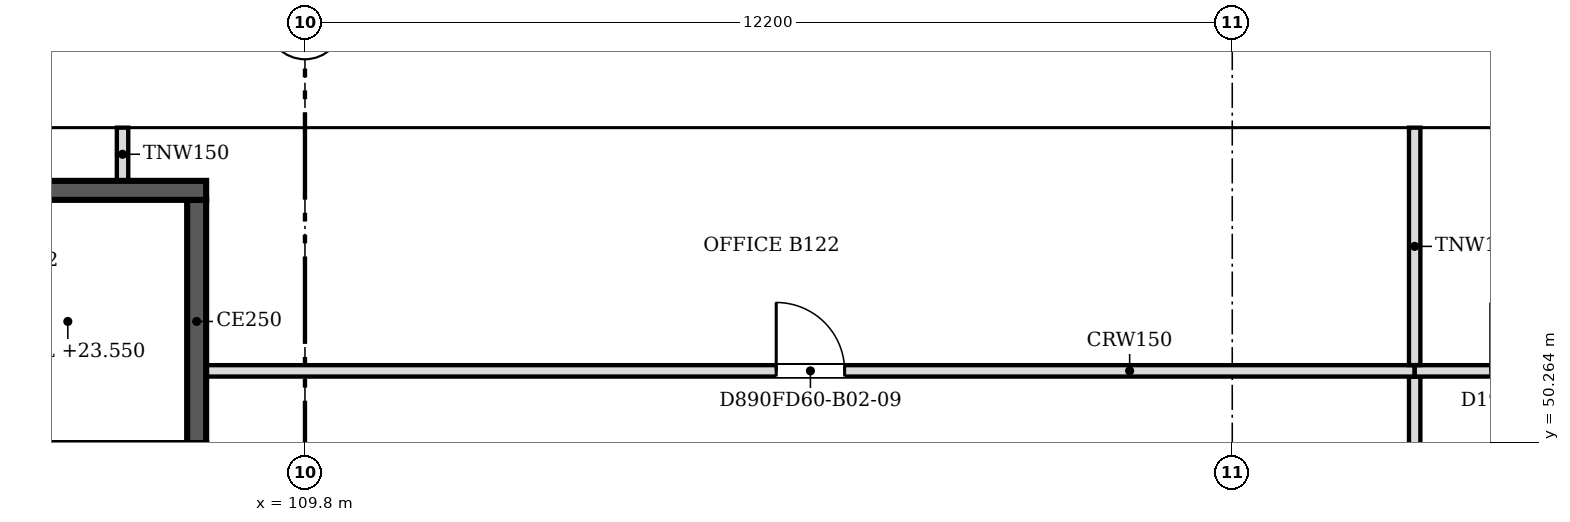
"""IFC4 building model, lengths in metres.
Left out: names, types, materials, properties, quantities, classifications, styles, units other than length and angle.
Written with IfcOpenShell. Run it as: python <this file> out.ifc"""

import sys

from ifc_helpers import new_model, si_unit, direction, frame, frame_2d, origin, place, context, subcontext, project, spatial, polyline, rectangle, outline, extrude, faceted_brep, source, transform, mapped, element, fill, save


model = new_model("IFC4")
c1 = context("Model", 3, precision=1e-05, world=origin(), true_north=direction((0.0, 1.0)))
c2 = subcontext(c1, "Body", "Model", "MODEL_VIEW")
j1 = project(units=[si_unit("LENGTHUNIT", "METRE"), si_unit("PLANEANGLEUNIT", "RADIAN")], contexts=[c1])
p1 = place(None, origin())
s1 = spatial("IfcSite", under=j1, at=p1, CompositionType="ELEMENT")
p2 = place(p1, origin())
s2 = spatial("IfcBuilding", under=s1, at=p2, CompositionType="ELEMENT")
p3 = place(p2, frame((0.0, 0.0, 21.3)))
s3 = spatial("IfcBuildingStorey", under=s2, at=p3, CompositionType="ELEMENT", Elevation=21.3)
m1 = source(origin(), c2, "Body", "Brep", [
    faceted_brep([(3.003, -0.25, 0.0), (6.053, -0.25, 4.5), (3.003, -0.25, 9.0), (0.0, -0.25, 4.5), (0.047, 0.25, 4.57), (3.003, 0.25, 9.0), (6.053, 0.25, 4.5), (3.003, 0.25, 0.0), (0.047, 0.25, 4.43), (0.0, 0.0, 4.5)], [[[0, 1, 2, 3]], [[4, 5, 6, 7, 8]], [[7, 6, 1, 0]], [[6, 5, 2, 1]], [[5, 4, 9, 3, 2]], [[8, 7, 0, 3, 9]], [[8, 9, 4]]]),
])
p4 = place(p3, frame((128.053, 54.65, -4.5), z_axis=(0.0, 0.0, 1.0), x_axis=(-1.0, 0.0, 0.0)))
e1 = element("IfcWall", 1, at=p4, inside=s3, PredefinedType="SOLIDWALL", context=c2, shape_type="MappedRepresentation", body=[
    mapped(m1, transform((0.0, 0.0, 0.0), scale=1.0)),
])
m2 = source(origin(), c2, "Body", "SweptSolid", [
    extrude(outline(polyline([(3.005, 0.448), (5.751, 4.5), (3.005, 8.552), (0.301, 4.5), (3.005, 0.448)])), frame((0.0, 0.26, 0.0), z_axis=(0.0, -1.0, 0.0), x_axis=(1.0, 0.0, 0.0)), (0.0, 0.0, 1.0), 0.52),
])
p5 = place(p4, origin())
e2 = element("IfcOpeningElement", 2, at=p5, cuts=e1, PredefinedType="OPENING", context=c2, shape_type="MappedRepresentation", body=[
    mapped(m2, transform((0.0, 0.0, 0.0), scale=1.0)),
])
m3 = source(origin(), c2, "Body", "SweptSolid", [
    extrude(outline(polyline([(3.05, 0.0), (6.1, 4.5), (3.05, 9.0), (0.0, 4.5), (3.05, 0.0)])), frame((0.0, 0.25, 0.0), z_axis=(0.0, -1.0, 0.0), x_axis=(1.0, 0.0, 0.0)), (0.0, 0.0, 1.0), 0.5),
])
p6 = place(p3, frame((122.0, 54.65, -4.5), z_axis=(0.0, 0.0, 1.0), x_axis=(-1.0, 0.0, 0.0)))
e3 = element("IfcWall", 3, at=p6, inside=s3, PredefinedType="SOLIDWALL", context=c2, shape_type="MappedRepresentation", body=[
    mapped(m3, transform((0.0, 0.0, 0.0), scale=1.0)),
])
m4 = source(origin(), c2, "Body", "SweptSolid", [
    extrude(outline(polyline([(3.05, 0.446), (5.798, 4.5), (3.05, 8.554), (0.302, 4.5), (3.05, 0.446)])), frame((0.0, 0.26, 0.0), z_axis=(0.0, -1.0, 0.0), x_axis=(1.0, 0.0, 0.0)), (0.0, 0.0, 1.0), 0.52),
])
p7 = place(p6, origin())
e4 = element("IfcOpeningElement", 4, at=p7, cuts=e3, PredefinedType="OPENING", context=c2, shape_type="MappedRepresentation", body=[
    mapped(m4, transform((0.0, 0.0, 0.0), scale=1.0)),
])
m5 = source(origin(), c2, "Body", "Brep", [
    faceted_brep([(3.05, -0.25, 0.0), (6.1, -0.25, 4.5), (6.1, -0.25, 4.5), (3.05, -0.25, 9.0), (0.0, -0.25, 4.5), (0.0, 0.25, 4.5), (3.05, 0.25, 9.0), (6.1, 0.25, 4.5), (6.1, 0.25, 4.5), (3.05, 0.25, 0.0)], [[[0, 1, 2, 3, 4]], [[5, 6, 7, 8, 9]], [[9, 8, 1, 0]], [[7, 6, 3, 2]], [[6, 5, 4, 3]], [[5, 9, 0, 4]], [[1, 8, 7, 2]]]),
])
p8 = place(p3, frame((115.9, 54.65, -4.5), z_axis=(0.0, 0.0, 1.0), x_axis=(-1.0, 0.0, 0.0)))
e5 = element("IfcWall", 5, at=p8, inside=s3, PredefinedType="SOLIDWALL", context=c2, shape_type="MappedRepresentation", body=[
    mapped(m5, transform((0.0, 0.0, 0.0), scale=1.0)),
])
p9 = place(p8, origin())
e6 = element("IfcOpeningElement", 6, at=p9, cuts=e5, PredefinedType="OPENING", context=c2, shape_type="MappedRepresentation", body=[
    mapped(m4, transform((0.0, 0.0, 0.0), scale=1.0)),
])
p10 = place(p3, frame((109.8, 54.65, -4.5), z_axis=(0.0, 0.0, 1.0), x_axis=(-1.0, 0.0, 0.0)))
e7 = element("IfcWall", 7, at=p10, inside=s3, PredefinedType="SOLIDWALL", context=c2, shape_type="MappedRepresentation", body=[
    mapped(m3, transform((0.0, 0.0, 0.0), scale=1.0)),
])
p11 = place(p10, origin())
e8 = element("IfcOpeningElement", 8, at=p11, cuts=e7, PredefinedType="OPENING", context=c2, shape_type="MappedRepresentation", body=[
    mapped(m4, transform((0.0, 0.0, 0.0), scale=1.0)),
])
m6 = source(origin(), c2, "Body", "Brep", [
    faceted_brep([(0.047, -0.25, 0.0), (3.05, -0.25, 4.5), (0.0, -0.25, 4.5), (0.0, -0.25, 0.071), (0.093, 0.25, 4.5), (3.05, 0.25, 4.5), (0.093, 0.25, 0.07), (0.047, 0.0, 0.0)], [[[0, 1, 2, 3]], [[4, 5, 6]], [[6, 5, 1, 0, 7]], [[5, 4, 2, 1]], [[7, 0, 3]], [[6, 7, 3, 2, 4]]]),
])
p12 = place(p3, frame((128.1, 54.65, 0.0), z_axis=(0.0, 0.0, 1.0), x_axis=(-1.0, 0.0, 0.0)))
e9 = element("IfcWall", 9, at=p12, inside=s3, PredefinedType="SOLIDWALL", context=c2, shape_type="MappedRepresentation", body=[
    mapped(m6, transform((0.0, 0.0, 0.0), scale=1.0)),
])
m7 = source(origin(), c2, "Body", "SweptSolid", [
    extrude(outline(polyline([(0.247, 0.75), (2.583, 4.25), (0.247, 4.25), (0.247, 0.75)])), frame((0.0, 0.26, 0.0), z_axis=(0.0, -1.0, 0.0), x_axis=(1.0, 0.0, 0.0)), (0.0, 0.0, 1.0), 0.52),
])
p13 = place(p12, origin())
e10 = element("IfcOpeningElement", 10, at=p13, cuts=e9, PredefinedType="OPENING", context=c2, shape_type="MappedRepresentation", body=[
    mapped(m7, transform((0.0, 0.0, 0.0), scale=1.0)),
])
m8 = source(origin(), c2, "Body", "SweptSolid", [
    extrude(outline(polyline([(3.05, 0.0), (6.1, 4.5), (0.0, 4.5), (3.05, 0.0)])), frame((0.0, 0.25, 0.0), z_axis=(0.0, -1.0, 0.0), x_axis=(1.0, 0.0, 0.0)), (0.0, 0.0, 1.0), 0.5),
])
p14 = place(p3, frame((125.05, 54.65, 0.0), z_axis=(0.0, 0.0, 1.0), x_axis=(-1.0, 0.0, 0.0)))
e11 = element("IfcWall", 11, at=p14, inside=s3, PredefinedType="SOLIDWALL", context=c2, shape_type="MappedRepresentation", body=[
    mapped(m8, transform((0.0, 0.0, 0.0), scale=1.0)),
])
m9 = source(origin(), c2, "Body", "SweptSolid", [
    extrude(outline(polyline([(3.05, 0.446), (5.629, 4.25), (0.471, 4.25), (3.05, 0.446)])), frame((0.0, 0.26, 0.0), z_axis=(0.0, -1.0, 0.0), x_axis=(1.0, 0.0, 0.0)), (0.0, 0.0, 1.0), 0.52),
])
p15 = place(p14, origin())
e12 = element("IfcOpeningElement", 12, at=p15, cuts=e11, PredefinedType="OPENING", context=c2, shape_type="MappedRepresentation", body=[
    mapped(m9, transform((0.0, 0.0, 0.0), scale=1.0)),
])
m10 = source(origin(), c2, "Body", "Brep", [
    faceted_brep([(3.05, -0.25, 0.0), (6.1, -0.25, 4.5), (6.1, -0.25, 4.5), (0.0, -0.25, 4.5), (0.0, 0.25, 4.5), (6.1, 0.25, 4.5), (6.1, 0.25, 4.5), (3.05, 0.25, 0.0)], [[[0, 1, 2, 3]], [[4, 5, 6, 7]], [[7, 6, 1, 0]], [[5, 4, 3, 2]], [[4, 7, 0, 3]], [[1, 6, 5, 2]]]),
])
p16 = place(p3, frame((118.95, 54.65, 0.0), z_axis=(0.0, 0.0, 1.0), x_axis=(-1.0, 0.0, 0.0)))
e13 = element("IfcWall", 13, at=p16, inside=s3, PredefinedType="SOLIDWALL", context=c2, shape_type="MappedRepresentation", body=[
    mapped(m10, transform((0.0, 0.0, 0.0), scale=1.0)),
])
p17 = place(p16, origin())
e14 = element("IfcOpeningElement", 14, at=p17, cuts=e13, PredefinedType="OPENING", context=c2, shape_type="MappedRepresentation", body=[
    mapped(m9, transform((0.0, 0.0, 0.0), scale=1.0)),
])
p18 = place(p3, frame((112.85, 54.65, 0.0), z_axis=(0.0, 0.0, 1.0), x_axis=(-1.0, 0.0, 0.0)))
e15 = element("IfcWall", 15, at=p18, inside=s3, PredefinedType="SOLIDWALL", context=c2, shape_type="MappedRepresentation", body=[
    mapped(m8, transform((0.0, 0.0, 0.0), scale=1.0)),
])
p19 = place(p18, origin())
e16 = element("IfcOpeningElement", 16, at=p19, cuts=e15, PredefinedType="OPENING", context=c2, shape_type="MappedRepresentation", body=[
    mapped(m9, transform((0.0, 0.0, 0.0), scale=1.0)),
])
p20 = place(p3, frame((106.75, 54.65, 0.0), z_axis=(0.0, 0.0, 1.0), x_axis=(-1.0, 0.0, 0.0)))
e17 = element("IfcWall", 17, at=p20, inside=s3, PredefinedType="SOLIDWALL", context=c2, shape_type="MappedRepresentation", body=[
    mapped(m8, transform((0.0, 0.0, 0.0), scale=1.0)),
])
p21 = place(p20, origin())
e18 = element("IfcOpeningElement", 18, at=p21, cuts=e17, PredefinedType="OPENING", context=c2, shape_type="MappedRepresentation", body=[
    mapped(m9, transform((0.0, 0.0, 0.0), scale=1.0)),
])
p22 = place(p3, frame((100.0, 53.575, 0.0), z_axis=(0.0, 0.0, 1.0), x_axis=(1.0, 0.0, 0.0)))
e19 = element("IfcWall", 19, at=p22, inside=s3, PredefinedType="SOLIDWALL", context=c2, shape_type="SweptSolid", body=[
    extrude(rectangle(XDim=8.5, YDim=0.25, at=frame_2d((4.25, 0.0))), origin(), (0.0, 0.0, 1.0), 4.5),
])
p23 = place(p3, frame((108.375, 53.45, 0.0), z_axis=(0.0, 0.0, 1.0), x_axis=(0.0, -1.0, 0.0)))
e20 = element("IfcWall", 20, at=p23, inside=s3, PredefinedType="SOLIDWALL", context=c2, shape_type="SweptSolid", body=[
    extrude(rectangle(XDim=3.2, YDim=0.25, at=frame_2d((1.6, 0.0))), origin(), (0.0, 0.0, 1.0), 4.5),
])
p24 = place(p3, frame((124.4, 51.124, 0.0), z_axis=(0.0, 0.0, 1.0), x_axis=(0.0, -1.0, 0.0)))
e21 = element("IfcWall", 21, at=p24, inside=s3, PredefinedType="PARTITIONING", context=c2, shape_type="SweptSolid", body=[
    extrude(rectangle(XDim=14.524, YDim=0.15, at=frame_2d((7.262, 0.0))), origin(), (0.0, 0.0, 1.0), 3.767),
])
m11 = source(origin(), c2, "Body", "SweptSolid", [
    extrude(rectangle(XDim=1.0, YDim=2.1, at=frame_2d((0.5, 1.05))), frame((0.0, 0.085, 0.0), z_axis=(0.0, -1.0, 0.0), x_axis=(1.0, 0.0, 0.0)), (0.0, 0.0, 1.0), 0.17),
])
p25 = place(p24, frame((2.223, 0.0, 0.0)))
e22 = element("IfcOpeningElement", 22, at=p25, cuts=e21, PredefinedType="OPENING", context=c2, shape_type="MappedRepresentation", body=[
    mapped(m11, transform((0.0, 0.0, 0.0), scale=1.0)),
])
p26 = place(p24, frame((9.524, 0.0, 0.0)))
e23 = element("IfcOpeningElement", 23, at=p26, cuts=e21, PredefinedType="OPENING", context=c2, shape_type="MappedRepresentation", body=[
    mapped(m11, transform((0.0, 0.0, 0.0), scale=1.0)),
])
p27 = place(p3, frame((108.5, 51.2, 0.0), z_axis=(0.0, 0.0, 1.0), x_axis=(1.0, 0.0, 0.0)))
e24 = element("IfcWall", 24, at=p27, inside=s3, PredefinedType="PARTITIONING", context=c2, shape_type="SweptSolid", body=[
    extrude(rectangle(XDim=15.9, YDim=0.15, at=frame_2d((7.95, 0.0))), origin(), (0.0, 0.0, 1.0), 3.767),
])
m12 = source(origin(), c2, "Body", "SweptSolid", [
    extrude(rectangle(XDim=0.9, YDim=2.1, at=frame_2d((0.45, 1.05))), frame((0.0, 0.085, 0.0), z_axis=(0.0, -1.0, 0.0), x_axis=(1.0, 0.0, 0.0)), (0.0, 0.0, 1.0), 0.17),
])
p28 = place(p27, frame((7.5, 0.0, 0.0)))
e25 = element("IfcOpeningElement", 25, at=p28, cuts=e24, PredefinedType="OPENING", context=c2, shape_type="MappedRepresentation", body=[
    mapped(m12, transform((0.0, 0.0, 0.0), scale=1.0)),
])
p29 = place(p3, frame((124.401, 51.2, 0.0), z_axis=(0.0, 0.0, 1.0), x_axis=(1.0, 0.0, 0.0)))
e26 = element("IfcWall", 26, at=p29, inside=s3, PredefinedType="PARTITIONING", context=c2, shape_type="SweptSolid", body=[
    extrude(rectangle(XDim=2.973, YDim=0.15, at=frame_2d((1.487, 0.0))), origin(), (0.0, 0.0, 1.0), 3.767),
])
p30 = place(p29, frame((1.0, 0.0, 0.0)))
e27 = element("IfcOpeningElement", 27, at=p30, cuts=e26, PredefinedType="OPENING", context=c2, shape_type="MappedRepresentation", body=[
    mapped(m12, transform((0.0, 0.0, 0.0), scale=1.0)),
])
p31 = place(p3, frame((124.4, 51.276, 0.0), z_axis=(0.0, 0.0, 1.0), x_axis=(0.0, 1.0, 0.0)))
e28 = element("IfcWall", 28, at=p31, inside=s3, PredefinedType="PARTITIONING", context=c2, shape_type="SweptSolid", body=[
    extrude(rectangle(XDim=3.124, YDim=0.15, at=frame_2d((1.562, 0.0))), origin(), (0.0, 0.0, 1.0), 3.767),
])
p32 = place(p3, frame((107.4, 53.7, 0.0), z_axis=(0.0, 0.0, 1.0), x_axis=(0.0, 1.0, 0.0)))
e29 = element("IfcWall", 29, at=p32, inside=s3, PredefinedType="PARTITIONING", context=c2, shape_type="SweptSolid", body=[
    extrude(rectangle(XDim=0.7, YDim=0.15, at=frame_2d((0.35, 0.0))), origin(), (0.0, 0.0, 1.0), 3.767),
])
m13 = source(origin(), c2, "Body", "SweptSolid", [
    extrude(rectangle(XDim=0.9, YDim=2.1, at=frame_2d((0.45, 1.05))), frame((0.0, 0.025, 0.0), z_axis=(0.0, -1.0, 0.0), x_axis=(1.0, 0.0, 0.0)), (0.0, 0.0, 1.0), 0.05),
])
p33 = place(p28, origin())
e30 = element("IfcDoor", 30, at=p33, inside=s3, OperationType="SINGLE_SWING_LEFT", PredefinedType="DOOR", context=c2, shape_type="MappedRepresentation", body=[
    mapped(m13, transform((0.0, 0.0, 0.0), scale=1.0)),
])
fill(e25, e30)
save(model, sys.argv[1])
